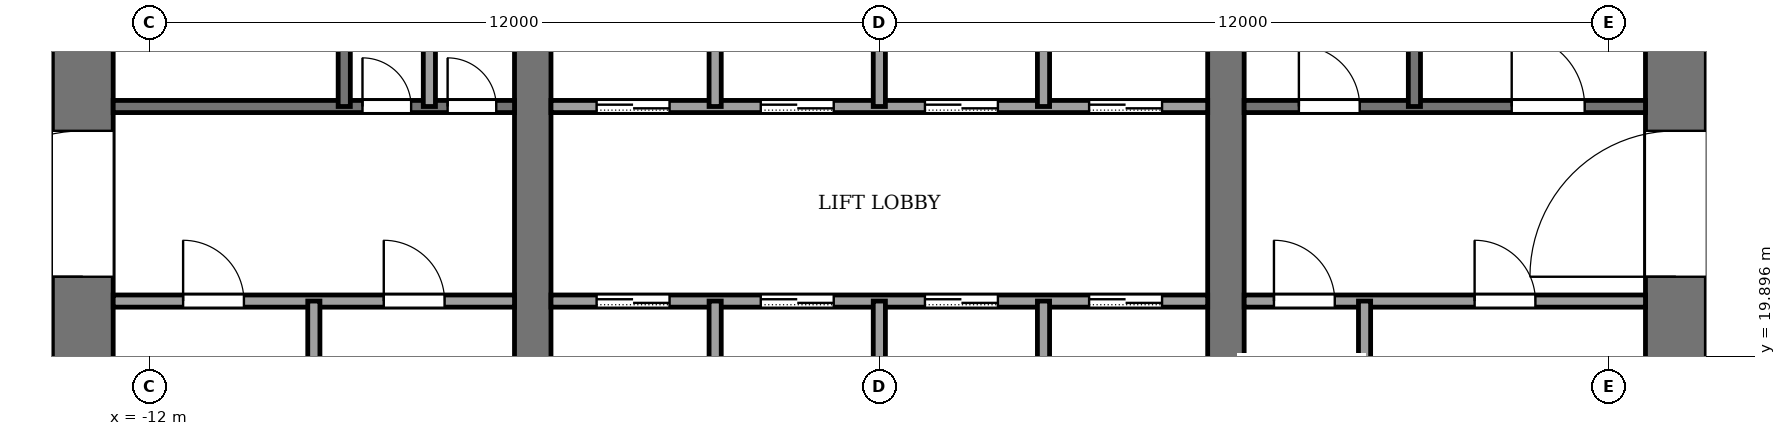
"""IFC4 building model, lengths in metres.
Left out: names, types, materials, properties, quantities, classifications, styles, units other than length and angle.
Written with IfcOpenShell. Run it as: python <this file> out.ifc"""

import sys

from ifc_helpers import new_model, si_unit, direction, frame, frame_2d, origin, place, context, subcontext, project, spatial, rectangle, extrude, element, fill, save


model = new_model("IFC4")
c1 = context("Model", 3, precision=1e-05, world=origin(), true_north=direction((0.0, 1.0)))
c2 = subcontext(c1, "Body", "Model", "MODEL_VIEW")
j1 = project(units=[si_unit("LENGTHUNIT", "METRE"), si_unit("PLANEANGLEUNIT", "RADIAN")], contexts=[c1])
p1 = place(None, origin())
s1 = spatial("IfcSite", under=j1, at=p1, CompositionType="ELEMENT")
p2 = place(p1, origin())
s2 = spatial("IfcBuilding", under=s1, at=p2, CompositionType="ELEMENT")
p3 = place(p2, frame((0.0, 0.0, 166.0)))
s3 = spatial("IfcBuildingStorey", under=s2, at=p3, CompositionType="ELEMENT", Elevation=166.0)
p4 = place(p3, frame((-13.1, 18.4, -0.13), z_axis=(0.0, 0.0, 1.0), x_axis=(0.0, 1.0, 0.0)))
e1 = element("IfcWall", 1, at=p4, inside=s3, PredefinedType="SHEAR", context=c2, shape_type="SweptSolid", body=[
    extrude(rectangle(XDim=19.2, YDim=1.0, at=frame_2d((9.6, 0.0))), origin(), (0.0, 0.0, 1.0), 3.88),
])
p5 = place(p4, frame((2.8, 0.0, 0.13)))
e2 = element("IfcOpeningElement", 2, at=p5, cuts=e1, PredefinedType="OPENING", context=c2, shape_type="SweptSolid", body=[
    extrude(rectangle(XDim=2.4, YDim=2.4, at=frame_2d((1.2, 1.2))), frame((0.0, 0.51, 0.0), z_axis=(0.0, -1.0, 0.0), x_axis=(1.0, 0.0, 0.0)), (0.0, 0.0, 1.0), 1.02),
])
p6 = place(p4, frame((13.4, 0.0, 0.13)))
e3 = element("IfcOpeningElement", 3, at=p6, cuts=e1, PredefinedType="OPENING", context=c2, shape_type="SweptSolid", body=[
    extrude(rectangle(XDim=1.4, YDim=2.2, at=frame_2d((0.7, 1.1))), frame((0.0, 0.51, 0.0), z_axis=(0.0, -1.0, 0.0), x_axis=(1.0, 0.0, 0.0)), (0.0, 0.0, 1.0), 1.02),
])
p7 = place(p3, frame((13.1, 18.4, -0.13), z_axis=(0.0, 0.0, 1.0), x_axis=(0.0, 1.0, 0.0)))
e4 = element("IfcWall", 4, at=p7, inside=s3, PredefinedType="SHEAR", context=c2, shape_type="SweptSolid", body=[
    extrude(rectangle(XDim=19.2, YDim=1.0, at=frame_2d((9.6, 0.0))), origin(), (0.0, 0.0, 1.0), 3.88),
])
p8 = place(p7, frame((2.8, 0.0, 0.13)))
e5 = element("IfcOpeningElement", 5, at=p8, cuts=e4, PredefinedType="OPENING", context=c2, shape_type="SweptSolid", body=[
    extrude(rectangle(XDim=2.4, YDim=2.4, at=frame_2d((1.2, 1.2))), frame((0.0, 0.51, 0.0), z_axis=(0.0, -1.0, 0.0), x_axis=(1.0, 0.0, 0.0)), (0.0, 0.0, 1.0), 1.02),
])
p9 = place(p7, frame((13.3, 0.0, 0.13)))
e6 = element("IfcOpeningElement", 6, at=p9, cuts=e4, PredefinedType="OPENING", context=c2, shape_type="SweptSolid", body=[
    extrude(rectangle(XDim=2.4, YDim=2.4, at=frame_2d((1.2, 1.2))), frame((0.0, 0.51, 0.0), z_axis=(0.0, -1.0, 0.0), x_axis=(1.0, 0.0, 0.0)), (0.0, 0.0, 1.0), 1.02),
])
p10 = place(p3, frame((-5.7, 18.4, -0.13), z_axis=(0.0, 0.0, 1.0), x_axis=(0.0, 1.0, 0.0)))
e7 = element("IfcWall", 7, at=p10, inside=s3, PredefinedType="SHEAR", context=c2, shape_type="SweptSolid", body=[
    extrude(rectangle(XDim=19.2, YDim=0.6, at=frame_2d((9.6, 0.0))), origin(), (0.0, 0.0, 1.0), 3.88),
])
p11 = place(p10, frame((8.35, 0.0, 0.13)))
e8 = element("IfcOpeningElement", 8, at=p11, cuts=e7, PredefinedType="OPENING", context=c2, shape_type="SweptSolid", body=[
    extrude(rectangle(XDim=0.9, YDim=2.1, at=frame_2d((0.45, 1.05))), frame((0.0, 0.31, 0.0), z_axis=(0.0, -1.0, 0.0), x_axis=(1.0, 0.0, 0.0)), (0.0, 0.0, 1.0), 0.62),
])
p12 = place(p3, frame((5.7, 18.4, -0.13), z_axis=(0.0, 0.0, 1.0), x_axis=(0.0, 1.0, 0.0)))
e9 = element("IfcWall", 9, at=p12, inside=s3, PredefinedType="SHEAR", context=c2, shape_type="SweptSolid", body=[
    extrude(rectangle(XDim=19.2, YDim=0.6, at=frame_2d((9.6, 0.0))), origin(), (0.0, 0.0, 1.0), 3.88),
])
p13 = place(p12, frame((8.35, 0.0, 0.13)))
e10 = element("IfcOpeningElement", 10, at=p13, cuts=e9, PredefinedType="OPENING", context=c2, shape_type="SweptSolid", body=[
    extrude(rectangle(XDim=0.9, YDim=2.1, at=frame_2d((0.45, 1.05))), frame((0.0, 0.31, 0.0), z_axis=(0.0, -1.0, 0.0), x_axis=(1.0, 0.0, 0.0)), (0.0, 0.0, 1.0), 0.62),
])
p14 = place(p12, frame((13.3, 0.0, 0.13)))
e11 = element("IfcOpeningElement", 11, at=p14, cuts=e9, PredefinedType="OPENING", context=c2, shape_type="SweptSolid", body=[
    extrude(rectangle(XDim=2.4, YDim=2.4, at=frame_2d((1.2, 1.2))), frame((0.0, 0.31, 0.0), z_axis=(0.0, -1.0, 0.0), x_axis=(1.0, 0.0, 0.0)), (0.0, 0.0, 1.0), 0.62),
])
p15 = place(p3, frame((-12.6, 20.8, 0.0), z_axis=(0.0, 0.0, 1.0), x_axis=(1.0, 0.0, 0.0)))
e12 = element("IfcWall", 12, at=p15, inside=s3, PredefinedType="PARTITIONING", context=c2, shape_type="SweptSolid", body=[
    extrude(rectangle(XDim=6.6, YDim=0.2, at=frame_2d((3.3, 0.0))), origin(), (0.0, 0.0, 1.0), 3.75),
])
p16 = place(p15, frame((1.15, 0.0, 0.0)))
e13 = element("IfcOpeningElement", 13, at=p16, cuts=e12, PredefinedType="OPENING", context=c2, shape_type="SweptSolid", body=[
    extrude(rectangle(XDim=1.0, YDim=2.1, at=frame_2d((0.5, 1.05))), frame((0.0, 0.11, 0.0), z_axis=(0.0, -1.0, 0.0), x_axis=(1.0, 0.0, 0.0)), (0.0, 0.0, 1.0), 0.22),
])
p17 = place(p15, frame((4.45, 0.0, 0.0)))
e14 = element("IfcOpeningElement", 14, at=p17, cuts=e12, PredefinedType="OPENING", context=c2, shape_type="SweptSolid", body=[
    extrude(rectangle(XDim=1.0, YDim=2.1, at=frame_2d((0.5, 1.05))), frame((0.0, 0.11, 0.0), z_axis=(0.0, -1.0, 0.0), x_axis=(1.0, 0.0, 0.0)), (0.0, 0.0, 1.0), 0.22),
])
p18 = place(p3, frame((-5.4, 20.8, 0.0), z_axis=(0.0, 0.0, 1.0), x_axis=(1.0, 0.0, 0.0)))
e15 = element("IfcWall", 15, at=p18, inside=s3, PredefinedType="PARTITIONING", context=c2, shape_type="SweptSolid", body=[
    extrude(rectangle(XDim=10.8, YDim=0.2, at=frame_2d((5.4, 0.0))), origin(), (0.0, 0.0, 1.0), 3.75),
])
p19 = place(p18, frame((0.75, 0.0, 0.0)))
e16 = element("IfcOpeningElement", 16, at=p19, cuts=e15, PredefinedType="OPENING", context=c2, shape_type="SweptSolid", body=[
    extrude(rectangle(XDim=1.2, YDim=2.2, at=frame_2d((0.6, 1.1))), frame((0.0, 0.11, 0.0), z_axis=(0.0, -1.0, 0.0), x_axis=(1.0, 0.0, 0.0)), (0.0, 0.0, 1.0), 0.22),
])
p20 = place(p18, frame((3.45, 0.0, 0.0)))
e17 = element("IfcOpeningElement", 17, at=p20, cuts=e15, PredefinedType="OPENING", context=c2, shape_type="SweptSolid", body=[
    extrude(rectangle(XDim=1.2, YDim=2.2, at=frame_2d((0.6, 1.1))), frame((0.0, 0.11, 0.0), z_axis=(0.0, -1.0, 0.0), x_axis=(1.0, 0.0, 0.0)), (0.0, 0.0, 1.0), 0.22),
])
p21 = place(p18, frame((6.15, 0.0, 0.0)))
e18 = element("IfcOpeningElement", 18, at=p21, cuts=e15, PredefinedType="OPENING", context=c2, shape_type="SweptSolid", body=[
    extrude(rectangle(XDim=1.2, YDim=2.2, at=frame_2d((0.6, 1.1))), frame((0.0, 0.11, 0.0), z_axis=(0.0, -1.0, 0.0), x_axis=(1.0, 0.0, 0.0)), (0.0, 0.0, 1.0), 0.22),
])
p22 = place(p18, frame((8.85, 0.0, 0.0)))
e19 = element("IfcOpeningElement", 19, at=p22, cuts=e15, PredefinedType="OPENING", context=c2, shape_type="SweptSolid", body=[
    extrude(rectangle(XDim=1.2, YDim=2.2, at=frame_2d((0.6, 1.1))), frame((0.0, 0.11, 0.0), z_axis=(0.0, -1.0, 0.0), x_axis=(1.0, 0.0, 0.0)), (0.0, 0.0, 1.0), 0.22),
])
p23 = place(p3, frame((6.0, 20.8, 0.0), z_axis=(0.0, 0.0, 1.0), x_axis=(1.0, 0.0, 0.0)))
e20 = element("IfcWall", 20, at=p23, inside=s3, PredefinedType="PARTITIONING", context=c2, shape_type="SweptSolid", body=[
    extrude(rectangle(XDim=6.6, YDim=0.2, at=frame_2d((3.3, 0.0))), origin(), (0.0, 0.0, 1.0), 3.75),
])
p24 = place(p23, frame((0.49, 0.0, 0.0)))
e21 = element("IfcOpeningElement", 21, at=p24, cuts=e20, PredefinedType="OPENING", context=c2, shape_type="SweptSolid", body=[
    extrude(rectangle(XDim=1.0, YDim=2.1, at=frame_2d((0.5, 1.05))), frame((0.0, 0.11, 0.0), z_axis=(0.0, -1.0, 0.0), x_axis=(1.0, 0.0, 0.0)), (0.0, 0.0, 1.0), 0.22),
])
p25 = place(p23, frame((3.79, 0.0, 0.0)))
e22 = element("IfcOpeningElement", 22, at=p25, cuts=e20, PredefinedType="OPENING", context=c2, shape_type="SweptSolid", body=[
    extrude(rectangle(XDim=1.0, YDim=2.1, at=frame_2d((0.5, 1.05))), frame((0.0, 0.11, 0.0), z_axis=(0.0, -1.0, 0.0), x_axis=(1.0, 0.0, 0.0)), (0.0, 0.0, 1.0), 0.22),
])
p26 = place(p3, frame((-12.6, 24.0, 0.0), z_axis=(0.0, 0.0, 1.0), x_axis=(1.0, 0.0, 0.0)))
e23 = element("IfcWall", 23, at=p26, inside=s3, PredefinedType="PARTITIONING", context=c2, shape_type="SweptSolid", body=[
    extrude(rectangle(XDim=6.6, YDim=0.2, at=frame_2d((3.3, 0.0))), origin(), (0.0, 0.0, 1.0), 3.75),
])
p27 = place(p26, frame((4.1, 0.0, 0.0)))
e24 = element("IfcOpeningElement", 24, at=p27, cuts=e23, PredefinedType="OPENING", context=c2, shape_type="SweptSolid", body=[
    extrude(rectangle(XDim=0.8, YDim=2.1, at=frame_2d((0.4, 1.05))), frame((0.0, 0.11, 0.0), z_axis=(0.0, -1.0, 0.0), x_axis=(1.0, 0.0, 0.0)), (0.0, 0.0, 1.0), 0.22),
])
p28 = place(p26, frame((5.5, 0.0, 0.0)))
e25 = element("IfcOpeningElement", 25, at=p28, cuts=e23, PredefinedType="OPENING", context=c2, shape_type="SweptSolid", body=[
    extrude(rectangle(XDim=0.8, YDim=2.1, at=frame_2d((0.4, 1.05))), frame((0.0, 0.11, 0.0), z_axis=(0.0, -1.0, 0.0), x_axis=(1.0, 0.0, 0.0)), (0.0, 0.0, 1.0), 0.22),
])
p29 = place(p3, frame((-5.4, 24.0, 0.0), z_axis=(0.0, 0.0, 1.0), x_axis=(1.0, 0.0, 0.0)))
e26 = element("IfcWall", 26, at=p29, inside=s3, PredefinedType="PARTITIONING", context=c2, shape_type="SweptSolid", body=[
    extrude(rectangle(XDim=10.8, YDim=0.2, at=frame_2d((5.4, 0.0))), origin(), (0.0, 0.0, 1.0), 3.75),
])
p30 = place(p29, frame((0.75, 0.0, 0.0)))
e27 = element("IfcOpeningElement", 27, at=p30, cuts=e26, PredefinedType="OPENING", context=c2, shape_type="SweptSolid", body=[
    extrude(rectangle(XDim=1.2, YDim=2.2, at=frame_2d((0.6, 1.1))), frame((0.0, 0.11, 0.0), z_axis=(0.0, -1.0, 0.0), x_axis=(1.0, 0.0, 0.0)), (0.0, 0.0, 1.0), 0.22),
])
p31 = place(p29, frame((3.45, 0.0, 0.0)))
e28 = element("IfcOpeningElement", 28, at=p31, cuts=e26, PredefinedType="OPENING", context=c2, shape_type="SweptSolid", body=[
    extrude(rectangle(XDim=1.2, YDim=2.2, at=frame_2d((0.6, 1.1))), frame((0.0, 0.11, 0.0), z_axis=(0.0, -1.0, 0.0), x_axis=(1.0, 0.0, 0.0)), (0.0, 0.0, 1.0), 0.22),
])
p32 = place(p29, frame((6.15, 0.0, 0.0)))
e29 = element("IfcOpeningElement", 29, at=p32, cuts=e26, PredefinedType="OPENING", context=c2, shape_type="SweptSolid", body=[
    extrude(rectangle(XDim=1.2, YDim=2.2, at=frame_2d((0.6, 1.1))), frame((0.0, 0.11, 0.0), z_axis=(0.0, -1.0, 0.0), x_axis=(1.0, 0.0, 0.0)), (0.0, 0.0, 1.0), 0.22),
])
p33 = place(p29, frame((8.85, 0.0, 0.0)))
e30 = element("IfcOpeningElement", 30, at=p33, cuts=e26, PredefinedType="OPENING", context=c2, shape_type="SweptSolid", body=[
    extrude(rectangle(XDim=1.2, YDim=2.2, at=frame_2d((0.6, 1.1))), frame((0.0, 0.11, 0.0), z_axis=(0.0, -1.0, 0.0), x_axis=(1.0, 0.0, 0.0)), (0.0, 0.0, 1.0), 0.22),
])
p34 = place(p3, frame((6.0, 24.0, 0.0), z_axis=(0.0, 0.0, 1.0), x_axis=(1.0, 0.0, 0.0)))
e31 = element("IfcWall", 31, at=p34, inside=s3, PredefinedType="PARTITIONING", context=c2, shape_type="SweptSolid", body=[
    extrude(rectangle(XDim=6.6, YDim=0.2, at=frame_2d((3.3, 0.0))), origin(), (0.0, 0.0, 1.0), 3.75),
])
p35 = place(p34, frame((0.9, 0.0, 0.0)))
e32 = element("IfcOpeningElement", 32, at=p35, cuts=e31, PredefinedType="OPENING", context=c2, shape_type="SweptSolid", body=[
    extrude(rectangle(XDim=1.0, YDim=2.1, at=frame_2d((0.5, 1.05))), frame((0.0, 0.11, 0.0), z_axis=(0.0, -1.0, 0.0), x_axis=(1.0, 0.0, 0.0)), (0.0, 0.0, 1.0), 0.22),
])
p36 = place(p34, frame((4.4, 0.0, 0.0)))
e33 = element("IfcOpeningElement", 33, at=p36, cuts=e31, PredefinedType="OPENING", context=c2, shape_type="SweptSolid", body=[
    extrude(rectangle(XDim=1.2, YDim=2.2, at=frame_2d((0.6, 1.1))), frame((0.0, 0.11, 0.0), z_axis=(0.0, -1.0, 0.0), x_axis=(1.0, 0.0, 0.0)), (0.0, 0.0, 1.0), 0.22),
])
p37 = place(p3, frame((-9.3, 18.4, 0.0), z_axis=(0.0, 0.0, 1.0), x_axis=(0.0, 1.0, 0.0)))
e34 = element("IfcWall", 34, at=p37, inside=s3, PredefinedType="PARTITIONING", context=c2, shape_type="SweptSolid", body=[
    extrude(rectangle(XDim=2.4, YDim=0.2, at=frame_2d((1.2, 0.0))), origin(), (0.0, 0.0, 1.0), 3.75),
])
for number, where, z_axis, x_axis in (
    (35, (-8.8, 24.0, 0.0), (0.0, 0.0, 1.0), (0.0, 1.0, 0.0)),
    (36, (-7.4, 24.0, 0.0), (0.0, 0.0, 1.0), (0.0, 1.0, 0.0)),
):
    element("IfcWall", number, at=place(p3, frame(where, z_axis=z_axis, x_axis=x_axis)), inside=s3, PredefinedType="PARTITIONING", context=c2, shape_type="SweptSolid", body=[
        extrude(rectangle(XDim=7.4, YDim=0.2, at=frame_2d((3.7, 0.0))), origin(), (0.0, 0.0, 1.0), 3.75),
    ])
p38 = place(p3, frame((-2.7, 18.4, 0.0), z_axis=(0.0, 0.0, 1.0), x_axis=(0.0, 1.0, 0.0)))
e37 = element("IfcWall", 37, at=p38, inside=s3, PredefinedType="PARTITIONING", context=c2, shape_type="SweptSolid", body=[
    extrude(rectangle(XDim=2.4, YDim=0.2, at=frame_2d((1.2, 0.0))), origin(), (0.0, 0.0, 1.0), 3.75),
])
p39 = place(p3, frame((-2.7, 24.0, 0.0), z_axis=(0.0, 0.0, 1.0), x_axis=(0.0, 1.0, 0.0)))
e38 = element("IfcWall", 38, at=p39, inside=s3, PredefinedType="PARTITIONING", context=c2, shape_type="SweptSolid", body=[
    extrude(rectangle(XDim=2.4, YDim=0.2, at=frame_2d((1.2, 0.0))), origin(), (0.0, 0.0, 1.0), 3.75),
])
p40 = place(p3, frame((0.0, 18.4, 0.0), z_axis=(0.0, 0.0, 1.0), x_axis=(0.0, 1.0, 0.0)))
e39 = element("IfcWall", 39, at=p40, inside=s3, PredefinedType="PARTITIONING", context=c2, shape_type="SweptSolid", body=[
    extrude(rectangle(XDim=2.4, YDim=0.2, at=frame_2d((1.2, 0.0))), origin(), (0.0, 0.0, 1.0), 3.75),
])
p41 = place(p3, frame((0.0, 24.0, 0.0), z_axis=(0.0, 0.0, 1.0), x_axis=(0.0, 1.0, 0.0)))
e40 = element("IfcWall", 40, at=p41, inside=s3, PredefinedType="PARTITIONING", context=c2, shape_type="SweptSolid", body=[
    extrude(rectangle(XDim=6.4, YDim=0.2, at=frame_2d((3.2, 0.0))), origin(), (0.0, 0.0, 1.0), 3.75),
])
p42 = place(p3, frame((2.7, 18.4, 0.0), z_axis=(0.0, 0.0, 1.0), x_axis=(0.0, 1.0, 0.0)))
e41 = element("IfcWall", 41, at=p42, inside=s3, PredefinedType="PARTITIONING", context=c2, shape_type="SweptSolid", body=[
    extrude(rectangle(XDim=2.4, YDim=0.2, at=frame_2d((1.2, 0.0))), origin(), (0.0, 0.0, 1.0), 3.75),
])
p43 = place(p3, frame((2.7, 24.0, 0.0), z_axis=(0.0, 0.0, 1.0), x_axis=(0.0, 1.0, 0.0)))
e42 = element("IfcWall", 42, at=p43, inside=s3, PredefinedType="PARTITIONING", context=c2, shape_type="SweptSolid", body=[
    extrude(rectangle(XDim=2.4, YDim=0.2, at=frame_2d((1.2, 0.0))), origin(), (0.0, 0.0, 1.0), 3.75),
])
p44 = place(p3, frame((7.98, 18.4, 0.0), z_axis=(0.0, 0.0, 1.0), x_axis=(0.0, 1.0, 0.0)))
e43 = element("IfcWall", 43, at=p44, inside=s3, PredefinedType="PARTITIONING", context=c2, shape_type="SweptSolid", body=[
    extrude(rectangle(XDim=2.4, YDim=0.2, at=frame_2d((1.2, 0.0))), origin(), (0.0, 0.0, 1.0), 3.75),
])
p45 = place(p3, frame((8.8, 24.0, 0.0), z_axis=(0.0, 0.0, 1.0), x_axis=(0.0, 1.0, 0.0)))
e44 = element("IfcWall", 44, at=p45, inside=s3, PredefinedType="PARTITIONING", context=c2, shape_type="SweptSolid", body=[
    extrude(rectangle(XDim=7.4, YDim=0.2, at=frame_2d((3.7, 0.0))), origin(), (0.0, 0.0, 1.0), 3.75),
])
p46 = place(p19, origin())
e45 = element("IfcDoor", 45, at=p46, inside=s3, OperationType="SLIDING_TO_LEFT", PredefinedType="DOOR", context=c2, shape_type="SweptSolid", body=[
    extrude(rectangle(XDim=1.2, YDim=2.2, at=frame_2d((0.6, 1.1))), frame((0.0, 0.025, 0.0), z_axis=(0.0, -1.0, 0.0), x_axis=(1.0, 0.0, 0.0)), (0.0, 0.0, 1.0), 0.05),
])
fill(e16, e45)
p47 = place(p20, origin())
e46 = element("IfcDoor", 46, at=p47, inside=s3, OperationType="SLIDING_TO_LEFT", PredefinedType="DOOR", context=c2, shape_type="SweptSolid", body=[
    extrude(rectangle(XDim=1.2, YDim=2.2, at=frame_2d((0.6, 1.1))), frame((0.0, 0.025, 0.0), z_axis=(0.0, -1.0, 0.0), x_axis=(1.0, 0.0, 0.0)), (0.0, 0.0, 1.0), 0.05),
])
fill(e17, e46)
p48 = place(p21, origin())
e47 = element("IfcDoor", 47, at=p48, inside=s3, OperationType="SLIDING_TO_LEFT", PredefinedType="DOOR", context=c2, shape_type="SweptSolid", body=[
    extrude(rectangle(XDim=1.2, YDim=2.2, at=frame_2d((0.6, 1.1))), frame((0.0, 0.025, 0.0), z_axis=(0.0, -1.0, 0.0), x_axis=(1.0, 0.0, 0.0)), (0.0, 0.0, 1.0), 0.05),
])
fill(e18, e47)
p49 = place(p22, origin())
e48 = element("IfcDoor", 48, at=p49, inside=s3, OperationType="SLIDING_TO_LEFT", PredefinedType="DOOR", context=c2, shape_type="SweptSolid", body=[
    extrude(rectangle(XDim=1.2, YDim=2.2, at=frame_2d((0.6, 1.1))), frame((0.0, 0.025, 0.0), z_axis=(0.0, -1.0, 0.0), x_axis=(1.0, 0.0, 0.0)), (0.0, 0.0, 1.0), 0.05),
])
fill(e19, e48)
p50 = place(p30, origin())
e49 = element("IfcDoor", 49, at=p50, inside=s3, OperationType="SLIDING_TO_LEFT", PredefinedType="DOOR", context=c2, shape_type="SweptSolid", body=[
    extrude(rectangle(XDim=1.2, YDim=2.2, at=frame_2d((0.6, 1.1))), frame((0.0, 0.025, 0.0), z_axis=(0.0, -1.0, 0.0), x_axis=(1.0, 0.0, 0.0)), (0.0, 0.0, 1.0), 0.05),
])
fill(e27, e49)
p51 = place(p31, origin())
e50 = element("IfcDoor", 50, at=p51, inside=s3, OperationType="SLIDING_TO_LEFT", PredefinedType="DOOR", context=c2, shape_type="SweptSolid", body=[
    extrude(rectangle(XDim=1.2, YDim=2.2, at=frame_2d((0.6, 1.1))), frame((0.0, 0.025, 0.0), z_axis=(0.0, -1.0, 0.0), x_axis=(1.0, 0.0, 0.0)), (0.0, 0.0, 1.0), 0.05),
])
fill(e28, e50)
p52 = place(p32, origin())
e51 = element("IfcDoor", 51, at=p52, inside=s3, OperationType="SLIDING_TO_LEFT", PredefinedType="DOOR", context=c2, shape_type="SweptSolid", body=[
    extrude(rectangle(XDim=1.2, YDim=2.2, at=frame_2d((0.6, 1.1))), frame((0.0, 0.025, 0.0), z_axis=(0.0, -1.0, 0.0), x_axis=(1.0, 0.0, 0.0)), (0.0, 0.0, 1.0), 0.05),
])
fill(e29, e51)
p53 = place(p33, origin())
e52 = element("IfcDoor", 52, at=p53, inside=s3, OperationType="SLIDING_TO_LEFT", PredefinedType="DOOR", context=c2, shape_type="SweptSolid", body=[
    extrude(rectangle(XDim=1.2, YDim=2.2, at=frame_2d((0.6, 1.1))), frame((0.0, 0.025, 0.0), z_axis=(0.0, -1.0, 0.0), x_axis=(1.0, 0.0, 0.0)), (0.0, 0.0, 1.0), 0.05),
])
fill(e30, e52)
p54 = place(p16, origin())
e53 = element("IfcDoor", 53, at=p54, inside=s3, OperationType="SINGLE_SWING_LEFT", PredefinedType="DOOR", context=c2, shape_type="SweptSolid", body=[
    extrude(rectangle(XDim=1.0, YDim=2.1, at=frame_2d((0.5, 1.05))), frame((0.0, 0.025, 0.0), z_axis=(0.0, -1.0, 0.0), x_axis=(1.0, 0.0, 0.0)), (0.0, 0.0, 1.0), 0.05),
])
fill(e13, e53)
p55 = place(p17, origin())
e54 = element("IfcDoor", 54, at=p55, inside=s3, OperationType="SINGLE_SWING_LEFT", PredefinedType="DOOR", context=c2, shape_type="SweptSolid", body=[
    extrude(rectangle(XDim=1.0, YDim=2.1, at=frame_2d((0.5, 1.05))), frame((0.0, 0.025, 0.0), z_axis=(0.0, -1.0, 0.0), x_axis=(1.0, 0.0, 0.0)), (0.0, 0.0, 1.0), 0.05),
])
fill(e14, e54)
p56 = place(p24, origin())
e55 = element("IfcDoor", 55, at=p56, inside=s3, OperationType="SINGLE_SWING_RIGHT", PredefinedType="DOOR", context=c2, shape_type="SweptSolid", body=[
    extrude(rectangle(XDim=1.0, YDim=2.1, at=frame_2d((0.5, 1.05))), frame((0.0, 0.025, 0.0), z_axis=(0.0, -1.0, 0.0), x_axis=(1.0, 0.0, 0.0)), (0.0, 0.0, 1.0), 0.05),
])
fill(e21, e55)
p57 = place(p25, origin())
e56 = element("IfcDoor", 56, at=p57, inside=s3, OperationType="SINGLE_SWING_RIGHT", PredefinedType="DOOR", context=c2, shape_type="SweptSolid", body=[
    extrude(rectangle(XDim=1.0, YDim=2.1, at=frame_2d((0.5, 1.05))), frame((0.0, 0.025, 0.0), z_axis=(0.0, -1.0, 0.0), x_axis=(1.0, 0.0, 0.0)), (0.0, 0.0, 1.0), 0.05),
])
fill(e22, e56)
p58 = place(p27, origin())
e57 = element("IfcDoor", 57, at=p58, inside=s3, OperationType="SINGLE_SWING_LEFT", PredefinedType="DOOR", context=c2, shape_type="SweptSolid", body=[
    extrude(rectangle(XDim=0.8, YDim=2.1, at=frame_2d((0.4, 1.05))), frame((0.0, 0.025, 0.0), z_axis=(0.0, -1.0, 0.0), x_axis=(1.0, 0.0, 0.0)), (0.0, 0.0, 1.0), 0.05),
])
fill(e24, e57)
p59 = place(p28, origin())
e58 = element("IfcDoor", 58, at=p59, inside=s3, OperationType="SINGLE_SWING_RIGHT", PredefinedType="DOOR", context=c2, shape_type="SweptSolid", body=[
    extrude(rectangle(XDim=0.8, YDim=2.1, at=frame_2d((0.4, 1.05))), frame((0.0, 0.025, 0.0), z_axis=(0.0, -1.0, 0.0), x_axis=(1.0, 0.0, 0.0)), (0.0, 0.0, 1.0), 0.05),
])
fill(e25, e58)
p60 = place(p35, origin())
e59 = element("IfcDoor", 59, at=p60, inside=s3, OperationType="SINGLE_SWING_RIGHT", PredefinedType="DOOR", context=c2, shape_type="SweptSolid", body=[
    extrude(rectangle(XDim=1.0, YDim=2.1, at=frame_2d((0.5, 1.05))), frame((0.0, 0.025, 0.0), z_axis=(0.0, -1.0, 0.0), x_axis=(1.0, 0.0, 0.0)), (0.0, 0.0, 1.0), 0.05),
])
fill(e32, e59)
p61 = place(p36, origin())
e60 = element("IfcDoor", 60, at=p61, inside=s3, OperationType="SINGLE_SWING_LEFT", PredefinedType="DOOR", context=c2, shape_type="SweptSolid", body=[
    extrude(rectangle(XDim=1.2, YDim=2.2, at=frame_2d((0.6, 1.1))), frame((0.0, 0.025, 0.0), z_axis=(0.0, -1.0, 0.0), x_axis=(1.0, 0.0, 0.0)), (0.0, 0.0, 1.0), 0.05),
])
fill(e33, e60)
p62 = place(p5, origin())
e61 = element("IfcDoor", 61, at=p62, inside=s3, OperationType="DOUBLE_DOOR_SINGLE_SWING", PredefinedType="DOOR", context=c2, shape_type="SweptSolid", body=[
    extrude(rectangle(XDim=2.4, YDim=2.4, at=frame_2d((1.2, 1.2))), frame((0.0, 0.025, 0.0), z_axis=(0.0, -1.0, 0.0), x_axis=(1.0, 0.0, 0.0)), (0.0, 0.0, 1.0), 0.05),
])
fill(e2, e61)
p63 = place(p8, origin())
e62 = element("IfcDoor", 62, at=p63, inside=s3, OperationType="DOUBLE_DOOR_SINGLE_SWING", PredefinedType="DOOR", context=c2, shape_type="SweptSolid", body=[
    extrude(rectangle(XDim=2.4, YDim=2.4, at=frame_2d((1.2, 1.2))), frame((0.0, 0.025, 0.0), z_axis=(0.0, -1.0, 0.0), x_axis=(1.0, 0.0, 0.0)), (0.0, 0.0, 1.0), 0.05),
])
fill(e5, e62)
save(model, sys.argv[1])
